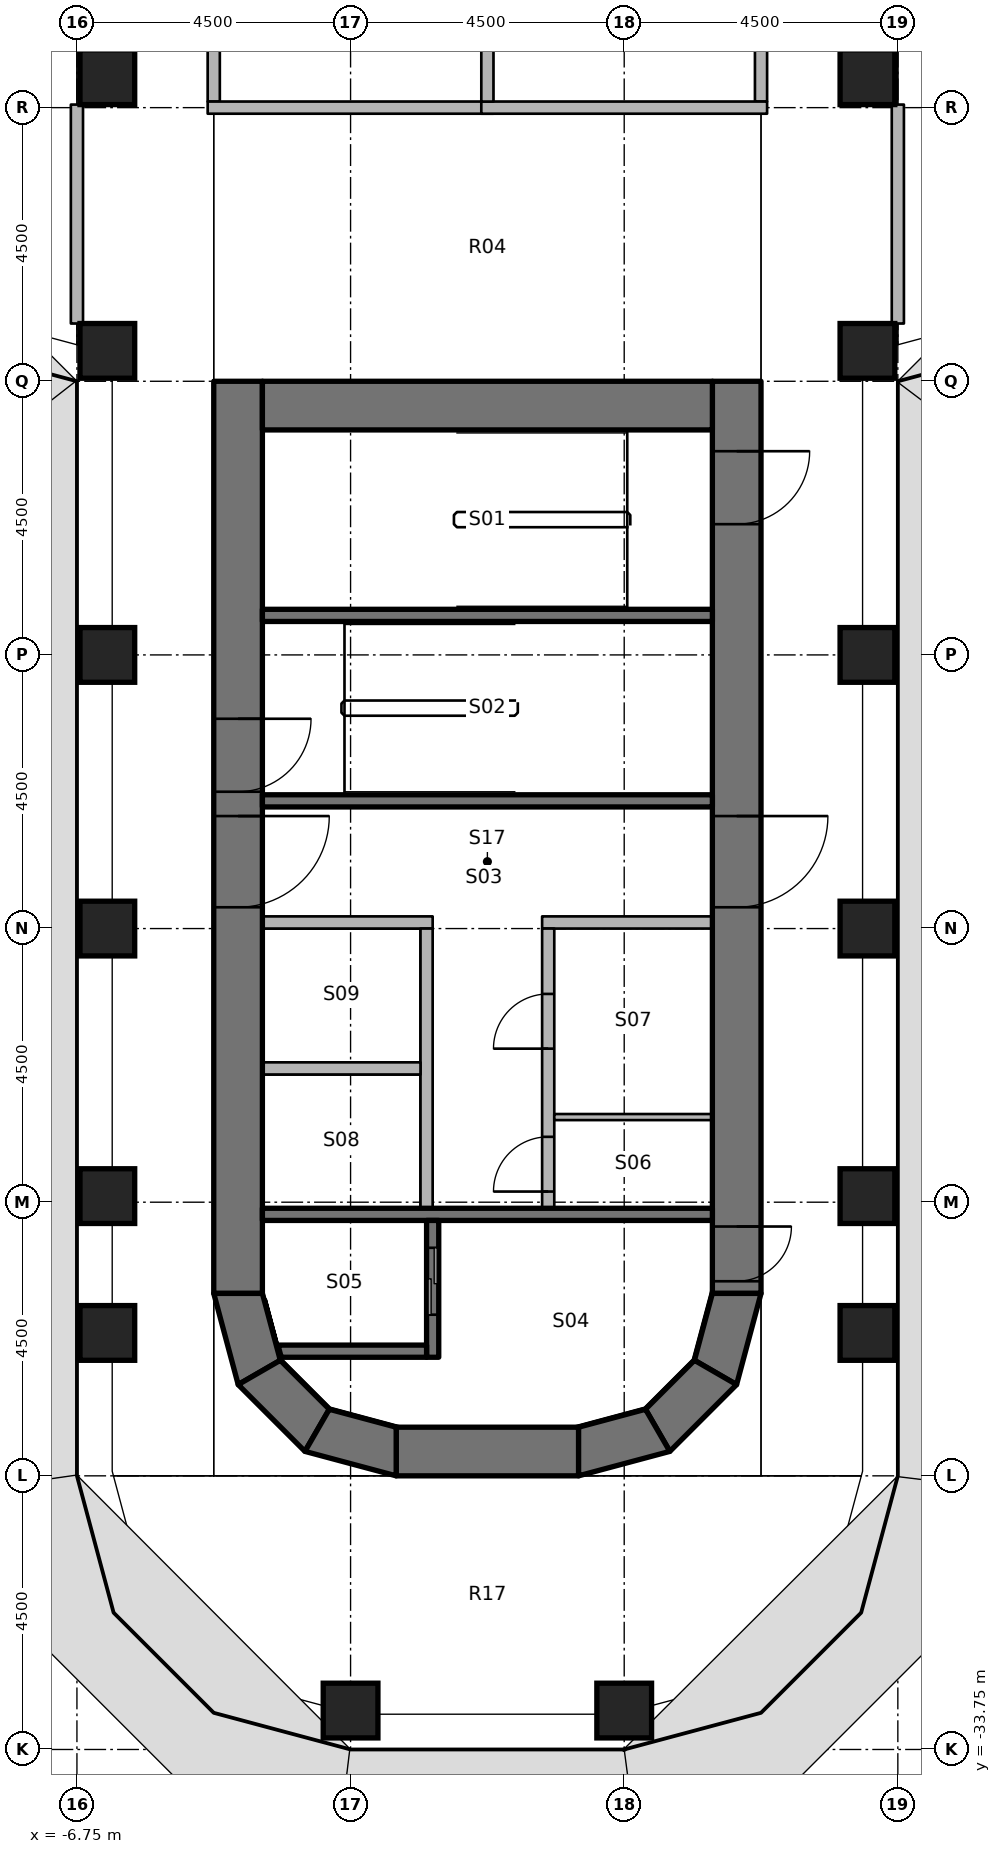
"""IFC4 building model, lengths in metres.
Left out: names, types, materials, properties, quantities, classifications, styles, units other than length and angle.
Written with IfcOpenShell. Run it as: python <this file> out.ifc"""

import sys

from ifc_helpers import new_model, si_unit, direction, frame, frame_2d, origin, origin_2d, place, context, subcontext, project, spatial, polyline, rectangle, outline, extrude, element, fill, save


model = new_model("IFC4")
c1 = context("Model", 3, precision=1e-05, world=origin(), true_north=direction((0.0, 1.0)))
c2 = subcontext(c1, "Body", "Model", "MODEL_VIEW")
j1 = project(units=[si_unit("LENGTHUNIT", "METRE"), si_unit("PLANEANGLEUNIT", "RADIAN")], contexts=[c1])
p1 = place(None, origin())
s1 = spatial("IfcSite", under=j1, at=p1, CompositionType="ELEMENT")
p2 = place(p1, origin())
s2 = spatial("IfcBuilding", under=s1, at=p2, CompositionType="ELEMENT")
p3 = place(p2, frame((0.0, 0.0, 128.4)))
s3 = spatial("IfcBuildingStorey", under=s2, at=p3, CompositionType="ELEMENT", Elevation=128.4)
for number, where, z_axis, x_axis in (
    (1, (-6.25, -26.9, 0.0), (0.0, 0.0, 1.0), (1.0, 0.0, 0.0)),
    (2, (-6.25, -24.65, 0.0), (0.0, 0.0, 1.0), (1.0, 0.0, 0.0)),
    (3, (-6.25, -20.25, 0.0), (0.0, 0.0, 1.0), (1.0, 0.0, 0.0)),
    (4, (-6.25, -15.75, 0.0), (0.0, 0.0, 1.0), (1.0, 0.0, 0.0)),
    (5, (-6.25, -10.75, 0.0), (0.0, 0.0, 1.0), (1.0, 0.0, 0.0)),
    (6, (-6.25, -6.25, 0.0), (0.0, 0.0, 1.0), (1.0, 0.0, 0.0)),
    (7, (-2.25, -33.11, 0.0), (0.0, 0.0, 1.0), (1.0, 0.0, 0.0)),
    (8, (2.25, -33.11, 0.0), (0.0, 0.0, 1.0), (1.0, 0.0, 0.0)),
    (9, (6.25, -26.9, 0.0), (0.0, 0.0, 1.0), (1.0, 0.0, 0.0)),
    (10, (6.25, -24.65, 0.0), (0.0, 0.0, 1.0), (1.0, 0.0, 0.0)),
    (11, (6.25, -20.25, 0.0), (0.0, 0.0, 1.0), (1.0, 0.0, 0.0)),
    (12, (6.25, -15.75, 0.0), (0.0, 0.0, 1.0), (1.0, 0.0, 0.0)),
    (13, (6.25, -10.75, 0.0), (0.0, 0.0, 1.0), (1.0, 0.0, 0.0)),
    (14, (6.25, -6.25, 0.0), (0.0, 0.0, 1.0), (1.0, 0.0, 0.0)),
):
    element("IfcColumn", number, at=place(p3, frame(where, z_axis=z_axis, x_axis=x_axis)), inside=s3, PredefinedType="COLUMN", context=c2, shape_type="SweptSolid", body=[
        extrude(rectangle(XDim=0.9, YDim=0.9, at=origin_2d()), origin(), (0.0, 0.0, 1.0), 3.65),
    ])
p4 = place(p3, frame((-4.1, -11.25, 0.0), z_axis=(0.0, 0.0, 1.0), x_axis=(0.0, -1.0, 0.0)))
e15 = element("IfcWall", 15, at=p4, inside=s3, PredefinedType="SHEAR", context=c2, shape_type="SweptSolid", body=[
    extrude(rectangle(XDim=15.0, YDim=0.8, at=frame_2d((7.5, 0.0))), origin(), (0.0, 0.0, 1.0), 3.8),
])
p5 = place(p4, frame((7.15, 0.0, 0.0)))
e16 = element("IfcOpeningElement", 16, at=p5, cuts=e15, PredefinedType="OPENING", context=c2, shape_type="SweptSolid", body=[
    extrude(rectangle(XDim=1.5, YDim=2.3, at=frame_2d((0.75, 1.15))), frame((0.0, 0.41, 0.0), z_axis=(0.0, -1.0, 0.0), x_axis=(1.0, 0.0, 0.0)), (0.0, 0.0, 1.0), 0.82),
])
p6 = place(p4, frame((5.55, 0.0, 0.0)))
e17 = element("IfcOpeningElement", 17, at=p6, cuts=e15, PredefinedType="OPENING", context=c2, shape_type="SweptSolid", body=[
    extrude(rectangle(XDim=1.2, YDim=2.1, at=frame_2d((0.6, 1.05))), frame((0.0, 0.41, 0.0), z_axis=(0.0, -1.0, 0.0), x_axis=(1.0, 0.0, 0.0)), (0.0, 0.0, 1.0), 0.82),
])
p7 = place(p3, frame((4.1, -11.25, 0.0), z_axis=(0.0, 0.0, 1.0), x_axis=(0.0, -1.0, 0.0)))
e18 = element("IfcWall", 18, at=p7, inside=s3, PredefinedType="SHEAR", context=c2, shape_type="SweptSolid", body=[
    extrude(rectangle(XDim=15.0, YDim=0.8, at=frame_2d((7.5, 0.0))), origin(), (0.0, 0.0, 1.0), 3.8),
])
p8 = place(p7, frame((7.15, 0.0, 0.0)))
e19 = element("IfcOpeningElement", 19, at=p8, cuts=e18, PredefinedType="OPENING", context=c2, shape_type="SweptSolid", body=[
    extrude(rectangle(XDim=1.5, YDim=2.3, at=frame_2d((0.75, 1.15))), frame((0.0, 0.41, 0.0), z_axis=(0.0, -1.0, 0.0), x_axis=(1.0, 0.0, 0.0)), (0.0, 0.0, 1.0), 0.82),
])
p9 = place(p7, frame((13.9, 0.0, 0.0)))
e20 = element("IfcOpeningElement", 20, at=p9, cuts=e18, PredefinedType="OPENING", context=c2, shape_type="SweptSolid", body=[
    extrude(rectangle(XDim=0.9, YDim=2.1, at=frame_2d((0.45, 1.05))), frame((0.0, 0.41, 0.0), z_axis=(0.0, -1.0, 0.0), x_axis=(1.0, 0.0, 0.0)), (0.0, 0.0, 1.0), 0.82),
])
p10 = place(p7, frame((1.15, 0.0, 0.0)))
e21 = element("IfcOpeningElement", 21, at=p10, cuts=e18, PredefinedType="OPENING", context=c2, shape_type="SweptSolid", body=[
    extrude(rectangle(XDim=1.2, YDim=2.1, at=frame_2d((0.6, 1.05))), frame((0.0, 0.41, 0.0), z_axis=(0.0, -1.0, 0.0), x_axis=(1.0, 0.0, 0.0)), (0.0, 0.0, 1.0), 0.82),
])
p11 = place(p3, frame((-3.7, -11.65, 0.0), z_axis=(0.0, 0.0, 1.0), x_axis=(1.0, 0.0, 0.0)))
e22 = element("IfcWall", 22, at=p11, inside=s3, PredefinedType="SHEAR", context=c2, shape_type="SweptSolid", body=[
    extrude(rectangle(XDim=7.4, YDim=0.8, at=frame_2d((3.7, 0.0))), origin(), (0.0, 0.0, 1.0), 3.8),
])
p12 = place(p3, frame((-1.5, -28.85, 0.0), z_axis=(0.0, 0.0, 1.0), x_axis=(1.0, 0.0, 0.0)))
e23 = element("IfcWall", 23, at=p12, inside=s3, PredefinedType="SHEAR", context=c2, shape_type="SweptSolid", body=[
    extrude(rectangle(XDim=3.0, YDim=0.8, at=frame_2d((1.5, 0.0))), origin(), (0.0, 0.0, 1.0), 3.8),
])
p13 = place(p3, origin())
e24 = element("IfcWall", 24, at=p13, inside=s3, PredefinedType="SHEAR", context=c2, shape_type="SweptSolid", body=[
    extrude(outline(polyline([(-4.5, -26.25), (-4.098, -27.75), (-3.405, -27.35), (-3.7, -26.25), (-4.5, -26.25)])), origin(), (0.0, 0.0, 1.0), 3.8),
])
p14 = place(p3, origin())
e25 = element("IfcWall", 25, at=p14, inside=s3, PredefinedType="SHEAR", context=c2, shape_type="SweptSolid", body=[
    extrude(outline(polyline([(-4.098, -27.75), (-3.0, -28.848), (-2.6, -28.155), (-3.405, -27.35), (-4.098, -27.75)])), origin(), (0.0, 0.0, 1.0), 3.8),
])
p15 = place(p3, origin())
e26 = element("IfcWall", 26, at=p15, inside=s3, PredefinedType="SHEAR", context=c2, shape_type="SweptSolid", body=[
    extrude(outline(polyline([(-3.0, -28.848), (-1.5, -29.25), (-1.5, -28.45), (-2.6, -28.155), (-3.0, -28.848)])), origin(), (0.0, 0.0, 1.0), 3.8),
])
p16 = place(p3, origin())
e27 = element("IfcWall", 27, at=p16, inside=s3, PredefinedType="SHEAR", context=c2, shape_type="SweptSolid", body=[
    extrude(outline(polyline([(4.5, -26.25), (4.098, -27.75), (3.405, -27.35), (3.7, -26.25), (4.5, -26.25)])), origin(), (0.0, 0.0, 1.0), 3.8),
])
p17 = place(p3, origin())
e28 = element("IfcWall", 28, at=p17, inside=s3, PredefinedType="SHEAR", context=c2, shape_type="SweptSolid", body=[
    extrude(outline(polyline([(4.098, -27.75), (3.0, -28.848), (2.6, -28.155), (3.405, -27.35), (4.098, -27.75)])), origin(), (0.0, 0.0, 1.0), 3.8),
])
p18 = place(p3, origin())
e29 = element("IfcWall", 29, at=p18, inside=s3, PredefinedType="SHEAR", context=c2, shape_type="SweptSolid", body=[
    extrude(outline(polyline([(3.0, -28.848), (1.5, -29.25), (1.5, -28.45), (2.6, -28.155), (3.0, -28.848)])), origin(), (0.0, 0.0, 1.0), 3.8),
])
p19 = place(p3, frame((3.7, -24.95, 0.0), z_axis=(0.0, 0.0, 1.0), x_axis=(-1.0, 0.0, 0.0)))
e30 = element("IfcWall", 30, at=p19, inside=s3, PredefinedType="SHEAR", context=c2, shape_type="SweptSolid", body=[
    extrude(rectangle(XDim=7.4, YDim=0.2, at=frame_2d((3.7, 0.0))), origin(), (0.0, 0.0, 1.0), 3.65),
])
p20 = place(p3, frame((-0.9, -27.3, 0.0), z_axis=(0.0, 0.0, 1.0), x_axis=(0.0, 1.0, 0.0)))
e31 = element("IfcWall", 31, at=p20, inside=s3, PredefinedType="SHEAR", context=c2, shape_type="SweptSolid", body=[
    extrude(rectangle(XDim=2.25, YDim=0.2, at=frame_2d((1.125, 0.0))), origin(), (0.0, 0.0, 1.0), 3.65),
])
p21 = place(p20, frame((0.7, 0.0, 0.0)))
e32 = element("IfcOpeningElement", 32, at=p21, cuts=e31, PredefinedType="OPENING", context=c2, shape_type="SweptSolid", body=[
    extrude(rectangle(XDim=1.1, YDim=2.3, at=frame_2d((0.55, 1.15))), frame((0.0, 0.11, 0.0), z_axis=(0.0, -1.0, 0.0), x_axis=(1.0, 0.0, 0.0)), (0.0, 0.0, 1.0), 0.22),
])
p22 = place(p3, origin())
e33 = element("IfcWall", 33, at=p22, inside=s3, PredefinedType="SHEAR", context=c2, shape_type="SweptSolid", body=[
    extrude(outline(polyline([(-1.0, -27.1), (-3.444, -27.1), (-3.39, -27.3), (-1.0, -27.3), (-1.0, -27.1)])), origin(), (0.0, 0.0, 1.0), 3.65),
])
for number, where, z_axis, x_axis in (
    (34, (3.7, -18.15, 0.0), (0.0, 0.0, 1.0), (-1.0, 0.0, 0.0)),
    (35, (3.7, -15.1, 0.0), (0.0, 0.0, 1.0), (-1.0, 0.0, 0.0)),
):
    element("IfcWall", number, at=place(p3, frame(where, z_axis=z_axis, x_axis=x_axis)), inside=s3, PredefinedType="SHEAR", context=c2, shape_type="SweptSolid", body=[
        extrude(rectangle(XDim=7.4, YDim=0.2, at=frame_2d((3.7, 0.0))), origin(), (0.0, 0.0, 1.0), 3.65),
    ])
p23 = place(p3, frame((3.7, -20.15, 0.0), z_axis=(0.0, 0.0, 1.0), x_axis=(-1.0, 0.0, 0.0)))
e36 = element("IfcWall", 36, at=p23, inside=s3, PredefinedType="PARTITIONING", context=c2, shape_type="SweptSolid", body=[
    extrude(rectangle(XDim=2.8, YDim=0.2, at=frame_2d((1.4, 0.0))), origin(), (0.0, 0.0, 1.0), 3.65),
])
p24 = place(p3, frame((1.0, -24.85, 0.0), z_axis=(0.0, 0.0, 1.0), x_axis=(0.0, 1.0, 0.0)))
e37 = element("IfcWall", 37, at=p24, inside=s3, PredefinedType="PARTITIONING", context=c2, shape_type="SweptSolid", body=[
    extrude(rectangle(XDim=4.6, YDim=0.2, at=frame_2d((2.3, 0.0))), origin(), (0.0, 0.0, 1.0), 3.65),
])
p25 = place(p24, frame((0.275, 0.0, 0.0)))
e38 = element("IfcOpeningElement", 38, at=p25, cuts=e37, PredefinedType="OPENING", context=c2, shape_type="SweptSolid", body=[
    extrude(rectangle(XDim=0.9, YDim=2.1, at=frame_2d((0.45, 1.05))), frame((0.0, 0.11, 0.0), z_axis=(0.0, -1.0, 0.0), x_axis=(1.0, 0.0, 0.0)), (0.0, 0.0, 1.0), 0.22),
])
p26 = place(p24, frame((2.625, 0.0, 0.0)))
e39 = element("IfcOpeningElement", 39, at=p26, cuts=e37, PredefinedType="OPENING", context=c2, shape_type="SweptSolid", body=[
    extrude(rectangle(XDim=0.9, YDim=2.1, at=frame_2d((0.45, 1.05))), frame((0.0, 0.11, 0.0), z_axis=(0.0, -1.0, 0.0), x_axis=(1.0, 0.0, 0.0)), (0.0, 0.0, 1.0), 0.22),
])
p27 = place(p3, frame((-0.9, -20.15, 0.0), z_axis=(0.0, 0.0, 1.0), x_axis=(-1.0, 0.0, 0.0)))
e40 = element("IfcWall", 40, at=p27, inside=s3, PredefinedType="PARTITIONING", context=c2, shape_type="SweptSolid", body=[
    extrude(rectangle(XDim=2.8, YDim=0.2, at=frame_2d((1.4, 0.0))), origin(), (0.0, 0.0, 1.0), 3.65),
])
p28 = place(p3, frame((-1.0, -24.85, 0.0), z_axis=(0.0, 0.0, 1.0), x_axis=(0.0, 1.0, 0.0)))
e41 = element("IfcWall", 41, at=p28, inside=s3, PredefinedType="PARTITIONING", context=c2, shape_type="SweptSolid", body=[
    extrude(rectangle(XDim=4.6, YDim=0.2, at=frame_2d((2.3, 0.0))), origin(), (0.0, 0.0, 1.0), 3.65),
])
p29 = place(p3, frame((3.7, -23.35, 0.0), z_axis=(0.0, 0.0, 1.0), x_axis=(-1.0, 0.0, 0.0)))
e42 = element("IfcWall", 42, at=p29, inside=s3, PredefinedType="PARTITIONING", context=c2, shape_type="SweptSolid", body=[
    extrude(rectangle(XDim=2.6, YDim=0.1, at=frame_2d((1.3, 0.0))), origin(), (0.0, 0.0, 1.0), 3.65),
])
p30 = place(p3, frame((-1.1, -22.55, 0.0), z_axis=(0.0, 0.0, 1.0), x_axis=(-1.0, 0.0, 0.0)))
e43 = element("IfcWall", 43, at=p30, inside=s3, PredefinedType="PARTITIONING", context=c2, shape_type="SweptSolid", body=[
    extrude(rectangle(XDim=2.6, YDim=0.2, at=frame_2d((1.3, 0.0))), origin(), (0.0, 0.0, 1.0), 3.65),
])
p31 = place(p3, frame((-4.5, 6.65, 0.0), z_axis=(0.0, 0.0, 1.0), x_axis=(0.0, -1.0, 0.0)))
e44 = element("IfcWall", 44, at=p31, inside=s3, PredefinedType="PARTITIONING", context=c2, shape_type="SweptSolid", body=[
    extrude(rectangle(XDim=13.3, YDim=0.2, at=frame_2d((6.65, 0.0))), origin(), (0.0, 0.0, 1.0), 2.738),
])
p32 = place(p31, frame((6.15, 0.0, 0.0)))
e45 = element("IfcOpeningElement", 45, at=p32, cuts=e44, PredefinedType="OPENING", context=c2, shape_type="SweptSolid", body=[
    extrude(rectangle(XDim=1.0, YDim=2.1, at=frame_2d((0.5, 1.05))), frame((0.0, 0.11, 0.0), z_axis=(0.0, -1.0, 0.0), x_axis=(1.0, 0.0, 0.0)), (0.0, 0.0, 1.0), 0.22),
])
p33 = place(p3, frame((-6.75, -10.3, 0.0), z_axis=(0.0, 0.0, 1.0), x_axis=(0.0, 1.0, 0.0)))
e46 = element("IfcWall", 46, at=p33, inside=s3, PredefinedType="PARTITIONING", context=c2, shape_type="SweptSolid", body=[
    extrude(rectangle(XDim=3.6, YDim=0.2, at=frame_2d((1.8, 0.0))), origin(), (0.0, 0.0, 1.0), 2.738),
])
p34 = place(p3, frame((4.5, -6.65, 0.0), z_axis=(0.0, 0.0, 1.0), x_axis=(0.0, 1.0, 0.0)))
e47 = element("IfcWall", 47, at=p34, inside=s3, PredefinedType="PARTITIONING", context=c2, shape_type="SweptSolid", body=[
    extrude(rectangle(XDim=13.3, YDim=0.2, at=frame_2d((6.65, 0.0))), origin(), (0.0, 0.0, 1.0), 2.738),
])
p35 = place(p34, frame((6.15, 0.0, 0.0)))
e48 = element("IfcOpeningElement", 48, at=p35, cuts=e47, PredefinedType="OPENING", context=c2, shape_type="SweptSolid", body=[
    extrude(rectangle(XDim=1.0, YDim=2.1, at=frame_2d((0.5, 1.05))), frame((0.0, 0.11, 0.0), z_axis=(0.0, -1.0, 0.0), x_axis=(1.0, 0.0, 0.0)), (0.0, 0.0, 1.0), 0.22),
])
p36 = place(p3, frame((6.75, -10.3, 0.0), z_axis=(0.0, 0.0, 1.0), x_axis=(0.0, 1.0, 0.0)))
e49 = element("IfcWall", 49, at=p36, inside=s3, PredefinedType="PARTITIONING", context=c2, shape_type="SweptSolid", body=[
    extrude(rectangle(XDim=3.6, YDim=0.2, at=frame_2d((1.8, 0.0))), origin(), (0.0, 0.0, 1.0), 2.738),
])
for number, where, z_axis, x_axis in (
    (50, (-4.6, -6.75, 0.0), (0.0, 0.0, 1.0), (1.0, 0.0, 0.0)),
    (51, (-0.1, -6.75, 0.0), (0.0, 0.0, 1.0), (1.0, 0.0, 0.0)),
):
    element("IfcWall", number, at=place(p3, frame(where, z_axis=z_axis, x_axis=x_axis)), inside=s3, PredefinedType="PARTITIONING", context=c2, shape_type="SweptSolid", body=[
        extrude(rectangle(XDim=4.7, YDim=0.2, at=frame_2d((2.35, 0.0))), origin(), (0.0, 0.0, 1.0), 2.738),
    ])
p37 = place(p3, frame((0.0, -6.65, 0.0), z_axis=(0.0, 0.0, 1.0), x_axis=(0.0, 1.0, 0.0)))
e52 = element("IfcWall", 52, at=p37, inside=s3, PredefinedType="PARTITIONING", context=c2, shape_type="SweptSolid", body=[
    extrude(rectangle(XDim=13.3, YDim=0.2, at=frame_2d((6.65, 0.0))), origin(), (0.0, 0.0, 1.0), 2.738),
])
p38 = place(p8, origin())
e53 = element("IfcDoor", 53, at=p38, inside=s3, OperationType="DOUBLE_DOOR_SINGLE_SWING", PredefinedType="DOOR", context=c2, shape_type="SweptSolid", body=[
    extrude(rectangle(XDim=1.5, YDim=2.3, at=frame_2d((0.75, 1.15))), frame((0.0, 0.025, 0.0), z_axis=(0.0, -1.0, 0.0), x_axis=(1.0, 0.0, 0.0)), (0.0, 0.0, 1.0), 0.05),
])
fill(e19, e53)
p39 = place(p5, origin())
e54 = element("IfcDoor", 54, at=p39, inside=s3, OperationType="DOUBLE_DOOR_SINGLE_SWING", PredefinedType="DOOR", context=c2, shape_type="SweptSolid", body=[
    extrude(rectangle(XDim=1.5, YDim=2.3, at=frame_2d((0.75, 1.15))), frame((0.0, 0.025, 0.0), z_axis=(0.0, -1.0, 0.0), x_axis=(1.0, 0.0, 0.0)), (0.0, 0.0, 1.0), 0.05),
])
fill(e16, e54)
p40 = place(p9, origin())
e55 = element("IfcDoor", 55, at=p40, inside=s3, OperationType="SINGLE_SWING_LEFT", PredefinedType="DOOR", context=c2, shape_type="SweptSolid", body=[
    extrude(rectangle(XDim=0.9, YDim=2.1, at=frame_2d((0.45, 1.05))), frame((0.0, 0.025, 0.0), z_axis=(0.0, -1.0, 0.0), x_axis=(1.0, 0.0, 0.0)), (0.0, 0.0, 1.0), 0.05),
])
fill(e20, e55)
p41 = place(p6, origin())
e56 = element("IfcDoor", 56, at=p41, inside=s3, OperationType="SINGLE_SWING_LEFT", PredefinedType="DOOR", context=c2, shape_type="SweptSolid", body=[
    extrude(rectangle(XDim=1.2, YDim=2.1, at=frame_2d((0.6, 1.05))), frame((0.0, 0.025, 0.0), z_axis=(0.0, -1.0, 0.0), x_axis=(1.0, 0.0, 0.0)), (0.0, 0.0, 1.0), 0.05),
])
fill(e17, e56)
p42 = place(p10, origin())
e57 = element("IfcDoor", 57, at=p42, inside=s3, OperationType="SINGLE_SWING_LEFT", PredefinedType="DOOR", context=c2, shape_type="SweptSolid", body=[
    extrude(rectangle(XDim=1.2, YDim=2.1, at=frame_2d((0.6, 1.05))), frame((0.0, 0.025, 0.0), z_axis=(0.0, -1.0, 0.0), x_axis=(1.0, 0.0, 0.0)), (0.0, 0.0, 1.0), 0.05),
])
fill(e21, e57)
p43 = place(p21, origin())
e58 = element("IfcDoor", 58, at=p43, inside=s3, OperationType="DOUBLE_DOOR_SLIDING", PredefinedType="DOOR", context=c2, shape_type="SweptSolid", body=[
    extrude(rectangle(XDim=1.1, YDim=2.3, at=frame_2d((0.55, 1.15))), frame((0.0, 0.025, 0.0), z_axis=(0.0, -1.0, 0.0), x_axis=(1.0, 0.0, 0.0)), (0.0, 0.0, 1.0), 0.05),
])
fill(e32, e58)
p44 = place(p25, origin())
e59 = element("IfcDoor", 59, at=p44, inside=s3, OperationType="SINGLE_SWING_RIGHT", PredefinedType="DOOR", context=c2, shape_type="SweptSolid", body=[
    extrude(rectangle(XDim=0.9, YDim=2.1, at=frame_2d((0.45, 1.05))), frame((0.0, 0.025, 0.0), z_axis=(0.0, -1.0, 0.0), x_axis=(1.0, 0.0, 0.0)), (0.0, 0.0, 1.0), 0.05),
])
fill(e38, e59)
p45 = place(p26, origin())
e60 = element("IfcDoor", 60, at=p45, inside=s3, OperationType="SINGLE_SWING_RIGHT", PredefinedType="DOOR", context=c2, shape_type="SweptSolid", body=[
    extrude(rectangle(XDim=0.9, YDim=2.1, at=frame_2d((0.45, 1.05))), frame((0.0, 0.025, 0.0), z_axis=(0.0, -1.0, 0.0), x_axis=(1.0, 0.0, 0.0)), (0.0, 0.0, 1.0), 0.05),
])
fill(e39, e60)
save(model, sys.argv[1])
